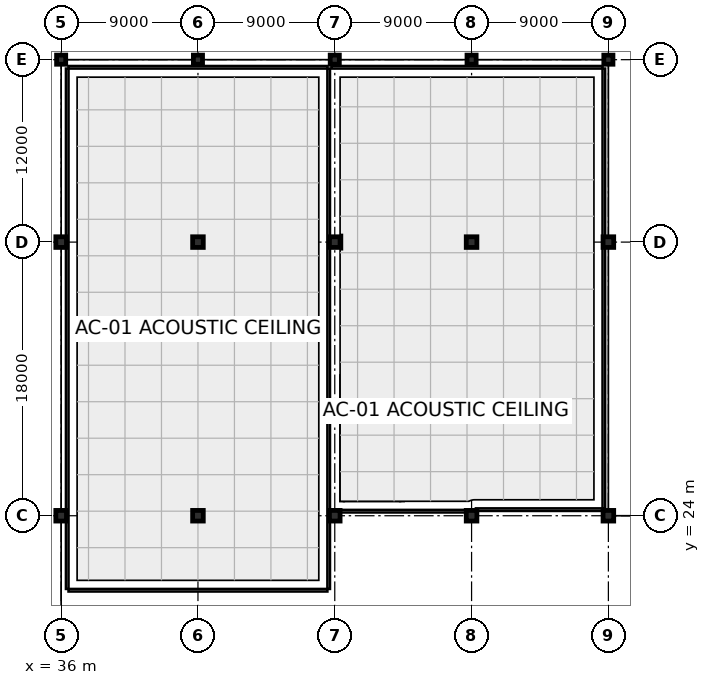
"""IFC4 building model, lengths in metres.
Left out: names, types, materials, properties, quantities, classifications, styles, units other than length and angle.
Written with IfcOpenShell. Run it as: python <this file> out.ifc"""

import sys

from ifc_helpers import new_model, si_unit, direction, frame, frame_2d, origin, origin_2d, place, context, subcontext, project, spatial, rectangle, extrude, element, fill, save


model = new_model("IFC4")
c1 = context("Model", 3, precision=1e-05, world=origin(), true_north=direction((0.0, 1.0)))
c2 = subcontext(c1, "Body", "Model", "MODEL_VIEW")
j1 = project(units=[si_unit("LENGTHUNIT", "METRE"), si_unit("PLANEANGLEUNIT", "RADIAN")], contexts=[c1])
p1 = place(None, origin())
s1 = spatial("IfcSite", under=j1, at=p1, CompositionType="ELEMENT")
p2 = place(p1, origin())
s2 = spatial("IfcBuilding", under=s1, at=p2, CompositionType="ELEMENT")
p3 = place(p2, frame((0.0, 0.0, -4.5)))
s3 = spatial("IfcBuildingStorey", under=s2, at=p3, CompositionType="ELEMENT", Elevation=-4.5)
for number, where, z_axis, x_axis in (
    (1, (36.0, 24.0, 0.0), (0.0, 0.0, 1.0), (1.0, 0.0, 0.0)),
    (2, (36.0, 42.0, 0.0), (0.0, 0.0, 1.0), (1.0, 0.0, 0.0)),
):
    element("IfcColumn", number, at=place(p3, frame(where, z_axis=z_axis, x_axis=x_axis)), inside=s3, PredefinedType="COLUMN", context=c2, shape_type="SweptSolid", body=[
        extrude(rectangle(XDim=0.7, YDim=0.7, at=origin_2d()), origin(), (0.0, 0.0, 1.0), 4.5),
    ])
p4 = place(p3, frame((36.0, 54.0, 0.0), z_axis=(0.0, 0.0, 1.0), x_axis=(1.0, 0.0, 0.0)))
e3 = element("IfcColumn", 3, at=p4, inside=s3, PredefinedType="COLUMN", context=c2, shape_type="SweptSolid", body=[
    extrude(rectangle(XDim=0.6, YDim=0.6, at=origin_2d()), origin(), (0.0, 0.0, 1.0), 4.5),
])
for number, where, z_axis, x_axis in (
    (4, (45.0, 24.0, 0.0), (0.0, 0.0, 1.0), (1.0, 0.0, 0.0)),
    (5, (45.0, 42.0, 0.0), (0.0, 0.0, 1.0), (1.0, 0.0, 0.0)),
):
    element("IfcColumn", number, at=place(p3, frame(where, z_axis=z_axis, x_axis=x_axis)), inside=s3, PredefinedType="COLUMN", context=c2, shape_type="SweptSolid", body=[
        extrude(rectangle(XDim=0.7, YDim=0.7, at=origin_2d()), origin(), (0.0, 0.0, 1.0), 4.5),
    ])
p5 = place(p3, frame((45.0, 54.0, 0.0), z_axis=(0.0, 0.0, 1.0), x_axis=(1.0, 0.0, 0.0)))
e6 = element("IfcColumn", 6, at=p5, inside=s3, PredefinedType="COLUMN", context=c2, shape_type="SweptSolid", body=[
    extrude(rectangle(XDim=0.6, YDim=0.6, at=origin_2d()), origin(), (0.0, 0.0, 1.0), 4.5),
])
for number, where, z_axis, x_axis in (
    (7, (54.0, 24.0, 0.0), (0.0, 0.0, 1.0), (1.0, 0.0, 0.0)),
    (8, (54.0, 42.0, 0.0), (0.0, 0.0, 1.0), (1.0, 0.0, 0.0)),
):
    element("IfcColumn", number, at=place(p3, frame(where, z_axis=z_axis, x_axis=x_axis)), inside=s3, PredefinedType="COLUMN", context=c2, shape_type="SweptSolid", body=[
        extrude(rectangle(XDim=0.7, YDim=0.7, at=origin_2d()), origin(), (0.0, 0.0, 1.0), 4.5),
    ])
p6 = place(p3, frame((54.0, 54.0, 0.0), z_axis=(0.0, 0.0, 1.0), x_axis=(1.0, 0.0, 0.0)))
e9 = element("IfcColumn", 9, at=p6, inside=s3, PredefinedType="COLUMN", context=c2, shape_type="SweptSolid", body=[
    extrude(rectangle(XDim=0.6, YDim=0.6, at=origin_2d()), origin(), (0.0, 0.0, 1.0), 4.5),
])
for number, where, z_axis, x_axis in (
    (10, (63.0, 24.0, 0.0), (0.0, 0.0, 1.0), (1.0, 0.0, 0.0)),
    (11, (63.0, 42.0, 0.0), (0.0, 0.0, 1.0), (1.0, 0.0, 0.0)),
):
    element("IfcColumn", number, at=place(p3, frame(where, z_axis=z_axis, x_axis=x_axis)), inside=s3, PredefinedType="COLUMN", context=c2, shape_type="SweptSolid", body=[
        extrude(rectangle(XDim=0.7, YDim=0.7, at=origin_2d()), origin(), (0.0, 0.0, 1.0), 4.5),
    ])
p7 = place(p3, frame((63.0, 54.0, 0.0), z_axis=(0.0, 0.0, 1.0), x_axis=(1.0, 0.0, 0.0)))
e12 = element("IfcColumn", 12, at=p7, inside=s3, PredefinedType="COLUMN", context=c2, shape_type="SweptSolid", body=[
    extrude(rectangle(XDim=0.6, YDim=0.6, at=origin_2d()), origin(), (0.0, 0.0, 1.0), 4.5),
])
for number, where, z_axis, x_axis in (
    (13, (72.0, 24.0, 0.0), (0.0, 0.0, 1.0), (1.0, 0.0, 0.0)),
    (14, (72.0, 42.0, 0.0), (0.0, 0.0, 1.0), (1.0, 0.0, 0.0)),
):
    element("IfcColumn", number, at=place(p3, frame(where, z_axis=z_axis, x_axis=x_axis)), inside=s3, PredefinedType="COLUMN", context=c2, shape_type="SweptSolid", body=[
        extrude(rectangle(XDim=0.7, YDim=0.7, at=origin_2d()), origin(), (0.0, 0.0, 1.0), 4.5),
    ])
p8 = place(p3, frame((72.0, 54.0, 0.0), z_axis=(0.0, 0.0, 1.0), x_axis=(1.0, 0.0, 0.0)))
e15 = element("IfcColumn", 15, at=p8, inside=s3, PredefinedType="COLUMN", context=c2, shape_type="SweptSolid", body=[
    extrude(rectangle(XDim=0.6, YDim=0.6, at=origin_2d()), origin(), (0.0, 0.0, 1.0), 4.5),
])
for number, where, z_axis, x_axis in (
    (16, (54.48, 24.96, 0.0), (0.0, 0.0, 1.0), (0.0, 1.0, 0.0)),
    (17, (58.42, 24.96, 0.0), (0.0, 0.0, 1.0), (0.0, 1.0, 0.0)),
):
    element("IfcWall", number, at=place(p3, frame(where, z_axis=z_axis, x_axis=x_axis)), inside=s3, PredefinedType="SHEAR", context=c2, shape_type="SweptSolid", body=[
        extrude(rectangle(XDim=8.28, YDim=0.24, at=frame_2d((4.14, 0.0))), origin(), (0.0, 0.0, 1.0), 4.31),
    ])
for number, where, z_axis, x_axis in (
    (18, (54.6, 25.08, 0.0), (0.0, 0.0, 1.0), (1.0, 0.0, 0.0)),
    (19, (54.6, 33.12, 0.0), (0.0, 0.0, 1.0), (1.0, 0.0, 0.0)),
):
    element("IfcWall", number, at=place(p3, frame(where, z_axis=z_axis, x_axis=x_axis)), inside=s3, PredefinedType="SHEAR", context=c2, shape_type="SweptSolid", body=[
        extrude(rectangle(XDim=3.7, YDim=0.24, at=frame_2d((1.85, 0.0))), origin(), (0.0, 0.0, 1.0), 4.31),
    ])
p9 = place(p3, frame((36.48, 53.5, 0.0), z_axis=(0.0, 0.0, 1.0), x_axis=(1.0, 0.0, 0.0)))
e20 = element("IfcWall", 20, at=p9, inside=s3, PredefinedType="PARTITIONING", context=c2, shape_type="SweptSolid", body=[
    extrude(rectangle(XDim=17.04, YDim=0.18, at=frame_2d((8.52, 0.0))), origin(), (0.0, 0.0, 1.0), 4.14),
])
p10 = place(p3, frame((53.6, 53.42, 0.0), z_axis=(0.0, 0.0, 1.0), x_axis=(0.0, -1.0, 0.0)))
e21 = element("IfcWall", 21, at=p10, inside=s3, PredefinedType="PARTITIONING", context=c2, shape_type="SweptSolid", body=[
    extrude(rectangle(XDim=34.24, YDim=0.18, at=frame_2d((17.12, 0.0))), origin(), (0.0, 0.0, 1.0), 4.14),
])
p11 = place(p3, frame((53.52, 19.1, 0.0), z_axis=(0.0, 0.0, 1.0), x_axis=(-1.0, 0.0, 0.0)))
e22 = element("IfcWall", 22, at=p11, inside=s3, PredefinedType="PARTITIONING", context=c2, shape_type="SweptSolid", body=[
    extrude(rectangle(XDim=17.04, YDim=0.18, at=frame_2d((8.52, 0.0))), origin(), (0.0, 0.0, 1.0), 4.14),
])
p12 = place(p11, frame((7.945, 0.0, 0.0)))
e23 = element("IfcOpeningElement", 23, at=p12, cuts=e22, PredefinedType="OPENING", context=c2, shape_type="SweptSolid", body=[
    extrude(rectangle(XDim=1.15, YDim=2.15, at=frame_2d((0.575, 1.075))), frame((0.0, 0.105, 0.0), z_axis=(0.0, -1.0, 0.0), x_axis=(1.0, 0.0, 0.0)), (0.0, 0.0, 1.0), 0.21),
])
p13 = place(p11, frame((14.09, 0.0, 1.05)))
e24 = element("IfcOpeningElement", 24, at=p13, cuts=e22, PredefinedType="OPENING", context=c2, shape_type="SweptSolid", body=[
    extrude(rectangle(XDim=2.1, YDim=1.2, at=frame_2d((1.05, 0.6))), frame((0.0, 0.105, 0.0), z_axis=(0.0, -1.0, 0.0), x_axis=(1.0, 0.0, 0.0)), (0.0, 0.0, 1.0), 0.21),
])
p14 = place(p3, frame((36.4, 19.18, 0.0), z_axis=(0.0, 0.0, 1.0), x_axis=(0.0, 1.0, 0.0)))
e25 = element("IfcWall", 25, at=p14, inside=s3, PredefinedType="PARTITIONING", context=c2, shape_type="SweptSolid", body=[
    extrude(rectangle(XDim=34.24, YDim=0.18, at=frame_2d((17.12, 0.0))), origin(), (0.0, 0.0, 1.0), 4.14),
])
p15 = place(p3, frame((71.7, 53.42, 0.0), z_axis=(0.0, 0.0, 1.0), x_axis=(0.0, -1.0, 0.0)))
e26 = element("IfcWall", 26, at=p15, inside=s3, PredefinedType="PARTITIONING", context=c2, shape_type="SweptSolid", body=[
    extrude(rectangle(XDim=28.94, YDim=0.18, at=frame_2d((14.47, 0.0))), origin(), (0.0, 0.0, 1.0), 4.14),
])
p16 = place(p3, frame((71.62, 24.4, 0.0), z_axis=(0.0, 0.0, 1.0), x_axis=(-1.0, 0.0, 0.0)))
e27 = element("IfcWall", 27, at=p16, inside=s3, PredefinedType="PARTITIONING", context=c2, shape_type="SweptSolid", body=[
    extrude(rectangle(XDim=8.34, YDim=0.18, at=frame_2d((4.17, 0.0))), origin(), (0.0, 0.0, 1.0), 4.14),
])
p17 = place(p16, frame((3.695, 0.0, 0.0)))
e28 = element("IfcOpeningElement", 28, at=p17, cuts=e27, PredefinedType="OPENING", context=c2, shape_type="SweptSolid", body=[
    extrude(rectangle(XDim=0.95, YDim=2.1, at=frame_2d((0.475, 1.05))), frame((0.0, 0.105, 0.0), z_axis=(0.0, -1.0, 0.0), x_axis=(1.0, 0.0, 0.0)), (0.0, 0.0, 1.0), 0.21),
])
p18 = place(p16, frame((5.69, 0.0, 1.05)))
e29 = element("IfcOpeningElement", 29, at=p18, cuts=e27, PredefinedType="OPENING", context=c2, shape_type="SweptSolid", body=[
    extrude(rectangle(XDim=1.8, YDim=1.1, at=frame_2d((0.9, 0.55))), frame((0.0, 0.105, 0.0), z_axis=(0.0, -1.0, 0.0), x_axis=(1.0, 0.0, 0.0)), (0.0, 0.0, 1.0), 0.21),
])
p19 = place(p3, frame((63.02, 24.3, 0.0), z_axis=(0.0, 0.0, 1.0), x_axis=(-1.0, 0.0, 0.0)))
e30 = element("IfcWall", 30, at=p19, inside=s3, PredefinedType="PARTITIONING", context=c2, shape_type="SweptSolid", body=[
    extrude(rectangle(XDim=9.24, YDim=0.18, at=frame_2d((4.62, 0.0))), origin(), (0.0, 0.0, 1.0), 4.14),
])
p20 = place(p3, frame((53.78, 53.5, 0.0), z_axis=(0.0, 0.0, 1.0), x_axis=(1.0, 0.0, 0.0)))
e31 = element("IfcWall", 31, at=p20, inside=s3, PredefinedType="PARTITIONING", context=c2, shape_type="SweptSolid", body=[
    extrude(rectangle(XDim=17.84, YDim=0.18, at=frame_2d((8.92, 0.0))), origin(), (0.0, 0.0, 1.0), 4.14),
])
p21 = place(p12, origin())
e32 = element("IfcDoor", 32, at=p21, inside=s3, OperationType="SINGLE_SWING_RIGHT", PredefinedType="DOOR", context=c2, shape_type="SweptSolid", body=[
    extrude(rectangle(XDim=1.15, YDim=2.15, at=frame_2d((0.575, 1.075))), frame((0.0, 0.025, 0.0), z_axis=(0.0, -1.0, 0.0), x_axis=(1.0, 0.0, 0.0)), (0.0, 0.0, 1.0), 0.05),
])
fill(e23, e32)
p22 = place(p13, origin())
e33 = element("IfcWindow", 33, at=p22, inside=s3, PartitioningType="SINGLE_PANEL", PredefinedType="WINDOW", context=c2, shape_type="SweptSolid", body=[
    extrude(rectangle(XDim=2.1, YDim=1.2, at=frame_2d((1.05, 0.6))), frame((0.0, 0.03, 0.0), z_axis=(0.0, -1.0, 0.0), x_axis=(1.0, 0.0, 0.0)), (0.0, 0.0, 1.0), 0.06),
])
fill(e24, e33)
p23 = place(p17, frame((0.95, 0.0, 0.0), z_axis=(0.0, 0.0, 1.0), x_axis=(-1.0, 0.0, 0.0)))
e34 = element("IfcDoor", 34, at=p23, inside=s3, OperationType="SINGLE_SWING_LEFT", PredefinedType="DOOR", context=c2, shape_type="SweptSolid", body=[
    extrude(rectangle(XDim=0.95, YDim=2.1, at=frame_2d((0.475, 1.05))), frame((0.0, 0.025, 0.0), z_axis=(0.0, -1.0, 0.0), x_axis=(1.0, 0.0, 0.0)), (0.0, 0.0, 1.0), 0.05),
])
fill(e28, e34)
p24 = place(p18, origin())
e35 = element("IfcWindow", 35, at=p24, inside=s3, PartitioningType="SINGLE_PANEL", PredefinedType="WINDOW", context=c2, shape_type="SweptSolid", body=[
    extrude(rectangle(XDim=1.8, YDim=1.1, at=frame_2d((0.9, 0.55))), frame((0.0, 0.03, 0.0), z_axis=(0.0, -1.0, 0.0), x_axis=(1.0, 0.0, 0.0)), (0.0, 0.0, 1.0), 0.06),
])
fill(e29, e35)
save(model, sys.argv[1])
